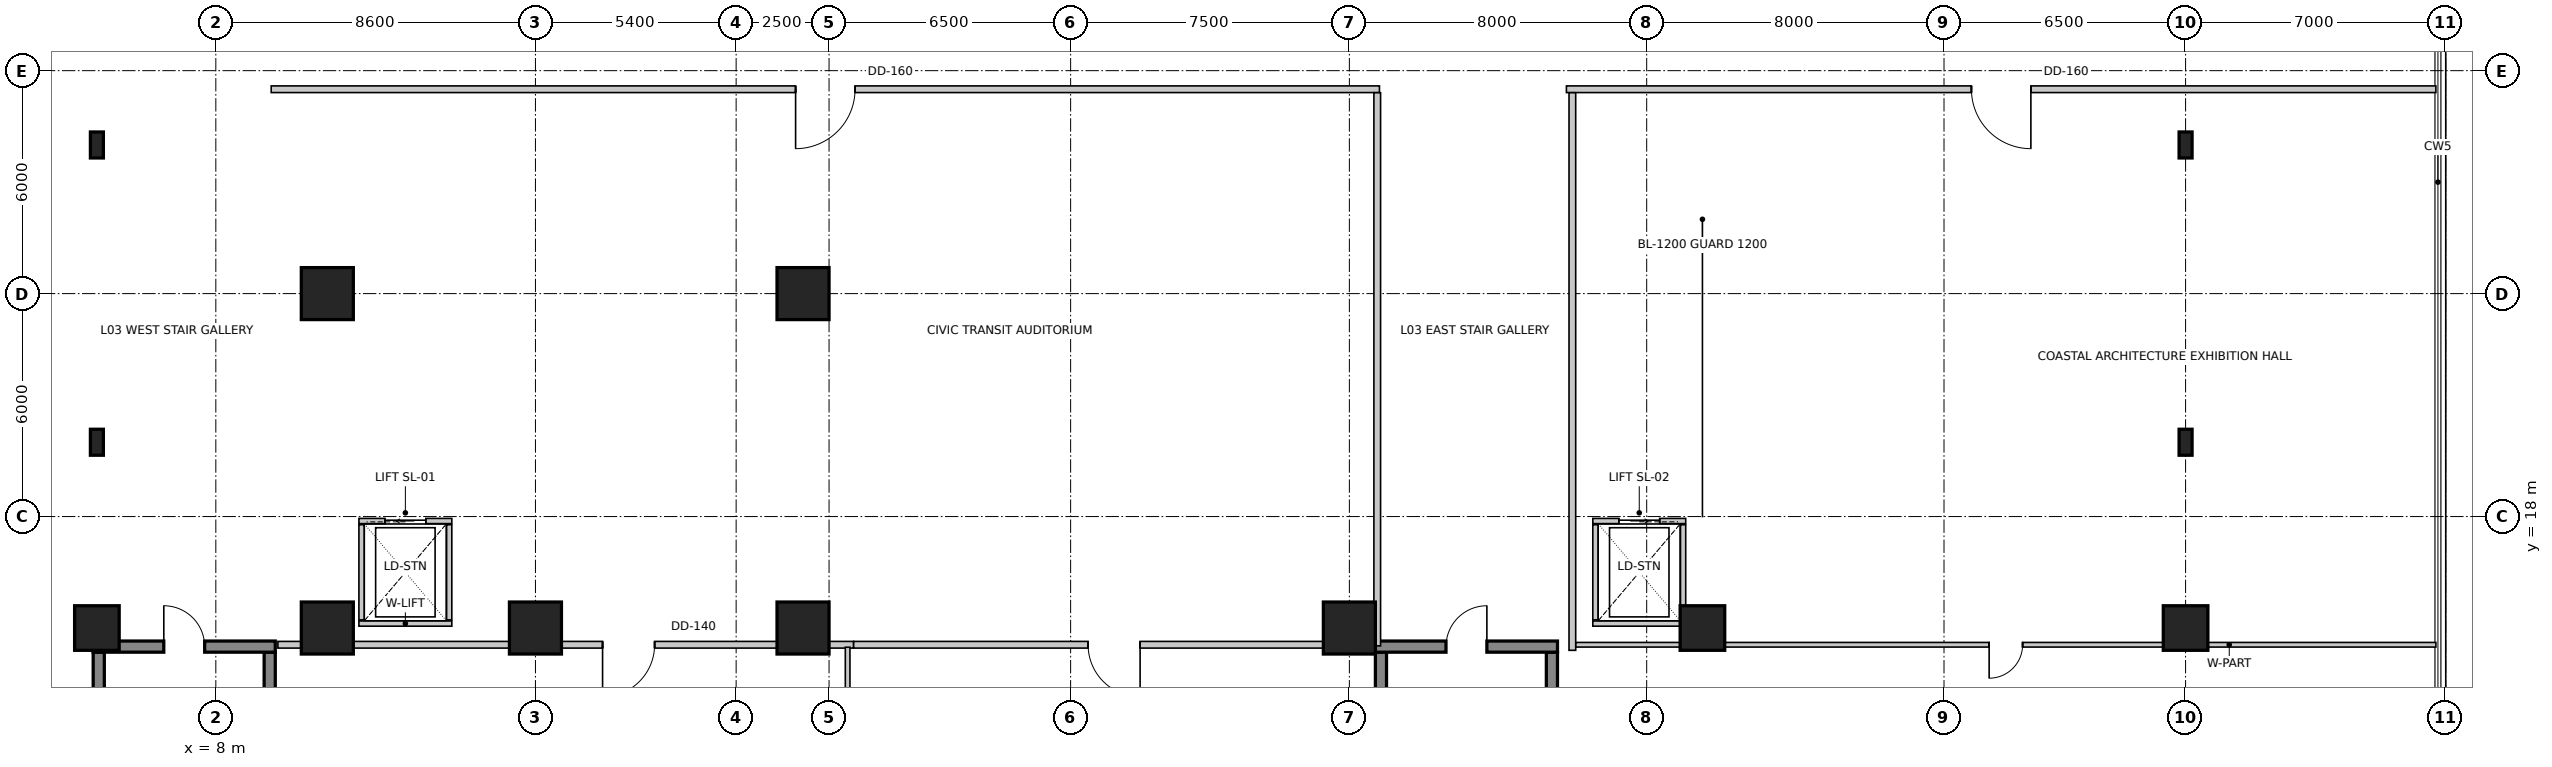
"""IFC4 building model, lengths in metres.
Left out: names, types, materials, properties, quantities, classifications, styles, units other than length and angle.
Written with IfcOpenShell. Run it as: python <this file> out.ifc"""

import sys

from ifc_helpers import new_model, si_unit, direction, frame, frame_2d, origin, origin_2d, place, context, subcontext, project, spatial, rectangle, extrude, source, transform, mapped, element, fill, save


model = new_model("IFC4")
c1 = context("Model", 3, precision=1e-05, world=origin(), true_north=direction((0.0, 1.0)))
c2 = subcontext(c1, "Body", "Model", "MODEL_VIEW")
j1 = project(units=[si_unit("LENGTHUNIT", "METRE"), si_unit("PLANEANGLEUNIT", "RADIAN")], contexts=[c1])
p1 = place(None, origin())
s1 = spatial("IfcSite", under=j1, at=p1, CompositionType="ELEMENT")
p2 = place(p1, origin())
s2 = spatial("IfcBuilding", under=s1, at=p2, CompositionType="ELEMENT")
p3 = place(p2, frame((0.0, 0.0, 11.2)))
s3 = spatial("IfcBuildingStorey", under=s2, at=p3, CompositionType="ELEMENT", Elevation=11.2)
for number, where, z_axis, x_axis in (
    (1, (4.85, 4.45, 0.0), (0.0, 0.0, 1.0), (0.0, 1.0, 0.0)),
    (2, (9.45, 4.45, 0.0), (0.0, 0.0, 1.0), (0.0, 1.0, 0.0)),
):
    element("IfcWall", number, at=place(p3, frame(where, z_axis=z_axis, x_axis=x_axis)), inside=s3, PredefinedType="SHEAR", context=c2, shape_type="SweptSolid", body=[
        extrude(rectangle(XDim=9.9, YDim=0.3, at=frame_2d((4.95, 0.0))), origin(), (0.0, 0.0, 1.0), 5.2),
    ])
p4 = place(p3, frame((4.7, 14.5, 0.0), z_axis=(0.0, 0.0, 1.0), x_axis=(1.0, 0.0, 0.0)))
e3 = element("IfcWall", 3, at=p4, inside=s3, PredefinedType="SHEAR", context=c2, shape_type="SweptSolid", body=[
    extrude(rectangle(XDim=4.9, YDim=0.3, at=frame_2d((2.45, 0.0))), origin(), (0.0, 0.0, 1.0), 5.2),
])
m1 = source(origin(), c2, "Body", "SweptSolid", [
    extrude(rectangle(XDim=1.1, YDim=2.15, at=frame_2d((0.55, 1.075))), frame((0.0, 0.16, 0.0), z_axis=(0.0, -1.0, 0.0), x_axis=(1.0, 0.0, 0.0)), (0.0, 0.0, 1.0), 0.32),
])
p5 = place(p4, frame((1.9, 0.0, 0.0)))
e4 = element("IfcOpeningElement", 4, at=p5, cuts=e3, PredefinedType="OPENING", context=c2, shape_type="MappedRepresentation", body=[
    mapped(m1, transform((0.0, 0.0, 0.0), scale=1.0)),
])
for number, where, z_axis, x_axis in (
    (5, (39.35, 4.45, 0.0), (0.0, 0.0, 1.0), (0.0, 1.0, 0.0)),
    (6, (43.95, 4.45, 0.0), (0.0, 0.0, 1.0), (0.0, 1.0, 0.0)),
):
    element("IfcWall", number, at=place(p3, frame(where, z_axis=z_axis, x_axis=x_axis)), inside=s3, PredefinedType="SHEAR", context=c2, shape_type="SweptSolid", body=[
        extrude(rectangle(XDim=9.9, YDim=0.3, at=frame_2d((4.95, 0.0))), origin(), (0.0, 0.0, 1.0), 5.2),
    ])
p6 = place(p3, frame((39.2, 14.5, 0.0), z_axis=(0.0, 0.0, 1.0), x_axis=(1.0, 0.0, 0.0)))
e7 = element("IfcWall", 7, at=p6, inside=s3, PredefinedType="SHEAR", context=c2, shape_type="SweptSolid", body=[
    extrude(rectangle(XDim=4.9, YDim=0.3, at=frame_2d((2.45, 0.0))), origin(), (0.0, 0.0, 1.0), 5.2),
])
p7 = place(p6, frame((1.9, 0.0, 0.0)))
e8 = element("IfcOpeningElement", 8, at=p7, cuts=e7, PredefinedType="OPENING", context=c2, shape_type="MappedRepresentation", body=[
    mapped(m1, transform((0.0, 0.0, 0.0), scale=1.0)),
])
m2 = source(origin(), c2, "Body", "SweptSolid", [
    extrude(rectangle(XDim=1.2, YDim=1.2, at=origin_2d()), origin(), (0.0, 0.0, 1.0), 5.2),
])
p8 = place(p3, frame((4.8, 15.0, 0.0), z_axis=(0.0, 0.0, 1.0), x_axis=(1.0, 0.0, 0.0)))
e9 = element("IfcColumn", 9, at=p8, inside=s3, PredefinedType="COLUMN", context=c2, shape_type="MappedRepresentation", body=[
    mapped(m2, transform((0.0, 0.0, 0.0), scale=1.0)),
])
m3 = source(origin(), c2, "Body", "SweptSolid", [
    extrude(rectangle(XDim=1.4, YDim=1.4, at=origin_2d()), origin(), (0.0, 0.0, 1.0), 5.2),
])
for number, where, z_axis, x_axis in (
    (10, (11.0, 15.0, 0.0), (0.0, 0.0, 1.0), (1.0, 0.0, 0.0)),
    (11, (16.6, 15.0, 0.0), (0.0, 0.0, 1.0), (1.0, 0.0, 0.0)),
    (12, (23.8, 15.0, 0.0), (0.0, 0.0, 1.0), (1.0, 0.0, 0.0)),
    (13, (38.5, 15.0, 0.0), (0.0, 0.0, 1.0), (1.0, 0.0, 0.0)),
):
    element("IfcColumn", number, at=place(p3, frame(where, z_axis=z_axis, x_axis=x_axis)), inside=s3, PredefinedType="COLUMN", context=c2, shape_type="MappedRepresentation", body=[
        mapped(m3, transform((0.0, 0.0, 0.0), scale=1.0)),
    ])
for number, where, z_axis, x_axis in (
    (14, (48.0, 15.0, 0.0), (0.0, 0.0, 1.0), (1.0, 0.0, 0.0)),
    (15, (61.0, 15.0, 0.0), (0.0, 0.0, 1.0), (1.0, 0.0, 0.0)),
):
    element("IfcColumn", number, at=place(p3, frame(where, z_axis=z_axis, x_axis=x_axis)), inside=s3, PredefinedType="COLUMN", context=c2, shape_type="MappedRepresentation", body=[
        mapped(m2, transform((0.0, 0.0, 0.0), scale=1.0)),
    ])
for number, where, z_axis, x_axis in (
    (16, (11.0, 24.0, 0.0), (0.0, 0.0, 1.0), (1.0, 0.0, 0.0)),
    (17, (23.8, 24.0, 0.0), (0.0, 0.0, 1.0), (1.0, 0.0, 0.0)),
):
    element("IfcColumn", number, at=place(p3, frame(where, z_axis=z_axis, x_axis=x_axis)), inside=s3, PredefinedType="COLUMN", context=c2, shape_type="MappedRepresentation", body=[
        mapped(m3, transform((0.0, 0.0, 0.0), scale=1.0)),
    ])
m4 = source(origin(), c2, "Body", "SweptSolid", [
    extrude(rectangle(XDim=0.35, YDim=0.7, at=origin_2d()), origin(), (0.0, 0.0, 1.0), 5.2),
])
for number, where, z_axis, x_axis in (
    (18, (4.8, 20.0, 0.0), (0.0, 0.0, 1.0), (1.0, 0.0, 0.0)),
    (19, (4.8, 28.0, 0.0), (0.0, 0.0, 1.0), (1.0, 0.0, 0.0)),
    (20, (61.0, 20.0, 0.0), (0.0, 0.0, 1.0), (1.0, 0.0, 0.0)),
    (21, (61.0, 28.0, 0.0), (0.0, 0.0, 1.0), (1.0, 0.0, 0.0)),
):
    element("IfcColumn", number, at=place(p3, frame(where, z_axis=z_axis, x_axis=x_axis)), inside=s3, PredefinedType="PILASTER", context=c2, shape_type="MappedRepresentation", body=[
        mapped(m4, transform((0.0, 0.0, 0.0), scale=1.0)),
    ])
p9 = place(p3, frame((11.85, 17.88, 0.0), z_axis=(0.0, 0.0, 1.0), x_axis=(1.0, 0.0, 0.0)))
e22 = element("IfcWall", 22, at=p9, inside=s3, PredefinedType="SOLIDWALL", context=c2, shape_type="SweptSolid", body=[
    extrude(rectangle(XDim=2.5, YDim=0.14, at=frame_2d((1.25, 0.0))), origin(), (0.0, 0.0, 1.0), 4.9),
])
m5 = source(origin(), c2, "Body", "SweptSolid", [
    extrude(rectangle(XDim=1.1, YDim=2.15, at=frame_2d((0.55, 1.075))), frame((0.0, 0.08, 0.0), z_axis=(0.0, -1.0, 0.0), x_axis=(1.0, 0.0, 0.0)), (0.0, 0.0, 1.0), 0.16),
])
p10 = place(p9, frame((0.7, 0.0, 0.0)))
e23 = element("IfcOpeningElement", 23, at=p10, cuts=e22, PredefinedType="OPENING", context=c2, shape_type="MappedRepresentation", body=[
    mapped(m5, transform((0.0, 0.0, 0.0), scale=1.0)),
])
p11 = place(p3, frame((11.85, 15.12, 0.0), z_axis=(0.0, 0.0, 1.0), x_axis=(1.0, 0.0, 0.0)))
e24 = element("IfcWall", 24, at=p11, inside=s3, PredefinedType="SOLIDWALL", context=c2, shape_type="SweptSolid", body=[
    extrude(rectangle(XDim=2.5, YDim=0.14, at=frame_2d((1.25, 0.0))), origin(), (0.0, 0.0, 1.0), 3.692),
])
for number, where, z_axis, x_axis in (
    (25, (11.92, 15.22, 0.0), (0.0, 0.0, 1.0), (0.0, 1.0, 0.0)),
    (26, (14.28, 15.22, 0.0), (0.0, 0.0, 1.0), (0.0, 1.0, 0.0)),
):
    element("IfcWall", number, at=place(p3, frame(where, z_axis=z_axis, x_axis=x_axis)), inside=s3, PredefinedType="SOLIDWALL", context=c2, shape_type="SweptSolid", body=[
        extrude(rectangle(XDim=2.56, YDim=0.14, at=frame_2d((1.28, 0.0))), origin(), (0.0, 0.0, 1.0), 3.692),
    ])
p12 = place(p3, frame((45.05, 17.88, 0.0), z_axis=(0.0, 0.0, 1.0), x_axis=(1.0, 0.0, 0.0)))
e27 = element("IfcWall", 27, at=p12, inside=s3, PredefinedType="SOLIDWALL", context=c2, shape_type="SweptSolid", body=[
    extrude(rectangle(XDim=2.5, YDim=0.14, at=frame_2d((1.25, 0.0))), origin(), (0.0, 0.0, 1.0), 4.9),
])
p13 = place(p12, frame((0.7, 0.0, 0.0)))
e28 = element("IfcOpeningElement", 28, at=p13, cuts=e27, PredefinedType="OPENING", context=c2, shape_type="MappedRepresentation", body=[
    mapped(m5, transform((0.0, 0.0, 0.0), scale=1.0)),
])
p14 = place(p3, frame((45.05, 15.12, 0.0), z_axis=(0.0, 0.0, 1.0), x_axis=(1.0, 0.0, 0.0)))
e29 = element("IfcWall", 29, at=p14, inside=s3, PredefinedType="SOLIDWALL", context=c2, shape_type="SweptSolid", body=[
    extrude(rectangle(XDim=2.5, YDim=0.14, at=frame_2d((1.25, 0.0))), origin(), (0.0, 0.0, 1.0), 3.692),
])
p15 = place(p3, frame((45.12, 15.22, 0.0), z_axis=(0.0, 0.0, 1.0), x_axis=(0.0, 1.0, 0.0)))
e30 = element("IfcWall", 30, at=p15, inside=s3, PredefinedType="SOLIDWALL", context=c2, shape_type="SweptSolid", body=[
    extrude(rectangle(XDim=2.56, YDim=0.14, at=frame_2d((1.28, 0.0))), origin(), (0.0, 0.0, 1.0), 3.692),
])
p16 = place(p3, frame((47.48, 15.22, 0.0), z_axis=(0.0, 0.0, 1.0), x_axis=(0.0, 1.0, 0.0)))
e31 = element("IfcWall", 31, at=p16, inside=s3, PredefinedType="SOLIDWALL", context=c2, shape_type="SweptSolid", body=[
    extrude(rectangle(XDim=2.56, YDim=0.14, at=frame_2d((1.28, 0.0))), origin(), (0.0, 0.0, 1.0), 3.092),
])
p17 = place(p3, frame((39.31, 29.5, 0.0), z_axis=(0.0, 0.0, 1.0), x_axis=(-1.0, 0.0, 0.0)))
e32 = element("IfcWall", 32, at=p17, inside=s3, PredefinedType="PARTITIONING", context=c2, shape_type="SweptSolid", body=[
    extrude(rectangle(XDim=29.82, YDim=0.18, at=frame_2d((14.91, 0.0))), origin(), (0.0, 0.0, 1.0), 4.03),
])
m6 = source(origin(), c2, "Body", "SweptSolid", [
    extrude(rectangle(XDim=1.6, YDim=2.15, at=frame_2d((0.8, 1.075))), frame((0.0, 0.1, 0.0), z_axis=(0.0, -1.0, 0.0), x_axis=(1.0, 0.0, 0.0)), (0.0, 0.0, 1.0), 0.2),
])
p18 = place(p17, frame((14.11, 0.0, 0.0)))
e33 = element("IfcOpeningElement", 33, at=p18, cuts=e32, PredefinedType="OPENING", context=c2, shape_type="MappedRepresentation", body=[
    mapped(m6, transform((0.0, 0.0, 0.0), scale=1.0)),
])
p19 = place(p3, frame((67.735, 29.5, 0.0), z_axis=(0.0, 0.0, 1.0), x_axis=(-1.0, 0.0, 0.0)))
e34 = element("IfcWall", 34, at=p19, inside=s3, PredefinedType="PARTITIONING", context=c2, shape_type="SweptSolid", body=[
    extrude(rectangle(XDim=23.395, YDim=0.18, at=frame_2d((11.698, 0.0))), origin(), (0.0, 0.0, 1.0), 3.092),
])
p20 = place(p19, frame((10.897, 0.0, 0.0)))
e35 = element("IfcOpeningElement", 35, at=p20, cuts=e34, PredefinedType="OPENING", context=c2, shape_type="MappedRepresentation", body=[
    mapped(m6, transform((0.0, 0.0, 0.0), scale=1.0)),
])
p21 = place(p3, frame((39.25, 14.52, 0.0), z_axis=(0.0, 0.0, 1.0), x_axis=(0.0, 1.0, 0.0)))
e36 = element("IfcWall", 36, at=p21, inside=s3, PredefinedType="PARTITIONING", context=c2, shape_type="SweptSolid", body=[
    extrude(rectangle(XDim=14.886, YDim=0.18, at=frame_2d((7.443, 0.0))), origin(), (0.0, 0.0, 1.0), 3.692),
])
p22 = place(p3, frame((44.5, 29.406, 0.0), z_axis=(0.0, 0.0, 1.0), x_axis=(0.0, -1.0, 0.0)))
e37 = element("IfcWall", 37, at=p22, inside=s3, PredefinedType="PARTITIONING", context=c2, shape_type="SweptSolid", body=[
    extrude(rectangle(XDim=15.006, YDim=0.18, at=frame_2d((7.503, 0.0))), origin(), (0.0, 0.0, 1.0), 3.692),
])
p23 = place(p3, frame((25.16, 14.55, 0.0), z_axis=(0.0, 0.0, 1.0), x_axis=(-1.0, 0.0, 0.0)))
e38 = element("IfcWall", 38, at=p23, inside=s3, PredefinedType="PARTITIONING", context=c2, shape_type="SweptSolid", body=[
    extrude(rectangle(XDim=15.49, YDim=0.18, at=frame_2d((7.745, 0.0))), origin(), (0.0, 0.0, 1.0), 3.942),
])
m7 = source(origin(), c2, "Body", "SweptSolid", [
    extrude(rectangle(XDim=1.4, YDim=2.15, at=frame_2d((0.7, 1.075))), frame((0.0, 0.1, 0.0), z_axis=(0.0, -1.0, 0.0), x_axis=(1.0, 0.0, 0.0)), (0.0, 0.0, 1.0), 0.2),
])
p24 = place(p23, frame((5.354, 0.0, 0.0)))
e39 = element("IfcOpeningElement", 39, at=p24, cuts=e38, PredefinedType="OPENING", context=c2, shape_type="MappedRepresentation", body=[
    mapped(m7, transform((0.0, 0.0, 0.0), scale=1.0)),
])
p25 = place(p3, frame((39.056, 14.55, 0.0), z_axis=(0.0, 0.0, 1.0), x_axis=(-1.0, 0.0, 0.0)))
e40 = element("IfcWall", 40, at=p25, inside=s3, PredefinedType="PARTITIONING", context=c2, shape_type="SweptSolid", body=[
    extrude(rectangle(XDim=13.894, YDim=0.18, at=frame_2d((6.947, 0.0))), origin(), (0.0, 0.0, 1.0), 4.485),
])
p26 = place(p25, frame((6.187, 0.0, 0.0)))
e41 = element("IfcOpeningElement", 41, at=p26, cuts=e40, PredefinedType="OPENING", context=c2, shape_type="MappedRepresentation", body=[
    mapped(m7, transform((0.0, 0.0, 0.0), scale=1.0)),
])
p27 = place(p3, frame((67.735, 14.55, 0.0), z_axis=(0.0, 0.0, 1.0), x_axis=(-1.0, 0.0, 0.0)))
e42 = element("IfcWall", 42, at=p27, inside=s3, PredefinedType="PARTITIONING", context=c2, shape_type="SweptSolid", body=[
    extrude(rectangle(XDim=23.141, YDim=0.125, at=frame_2d((11.571, 0.0))), origin(), (0.0, 0.0, 1.0), 3.942),
])
m8 = source(origin(), c2, "Body", "SweptSolid", [
    extrude(rectangle(XDim=0.9, YDim=2.15, at=frame_2d((0.45, 1.075))), frame((0.0, 0.073, 0.0), z_axis=(0.0, -1.0, 0.0), x_axis=(1.0, 0.0, 0.0)), (0.0, 0.0, 1.0), 0.145),
])
p28 = place(p27, frame((11.121, 0.0, 0.0)))
e43 = element("IfcOpeningElement", 43, at=p28, cuts=e42, PredefinedType="OPENING", context=c2, shape_type="MappedRepresentation", body=[
    mapped(m8, transform((0.0, 0.0, 0.0), scale=1.0)),
])
p29 = place(p3, frame((25.0, 14.483, 0.0), z_axis=(0.0, 0.0, 1.0), x_axis=(0.0, -1.0, 0.0)))
e44 = element("IfcWall", 44, at=p29, inside=s3, PredefinedType="PARTITIONING", context=c2, shape_type="SweptSolid", body=[
    extrude(rectangle(XDim=12.219, YDim=0.125, at=frame_2d((6.109, 0.0))), origin(), (0.0, 0.0, 1.0), 3.692),
])
m9 = source(origin(), c2, "Body", "SweptSolid", [
    extrude(rectangle(XDim=1.1, YDim=2.15, at=frame_2d((0.55, 1.075))), frame((0.0, 0.025, 0.0), z_axis=(0.0, -1.0, 0.0), x_axis=(1.0, 0.0, 0.0)), (0.0, 0.0, 1.0), 0.05),
])
p30 = place(p10, origin())
e45 = element("IfcDoor", 45, at=p30, inside=s3, OperationType="SLIDING_TO_LEFT", PredefinedType="DOOR", context=c2, shape_type="MappedRepresentation", body=[
    mapped(m9, transform((0.0, 0.0, 0.0), scale=1.0)),
])
fill(e23, e45)
p31 = place(p13, origin())
e46 = element("IfcDoor", 46, at=p31, inside=s3, OperationType="SLIDING_TO_RIGHT", PredefinedType="DOOR", context=c2, shape_type="MappedRepresentation", body=[
    mapped(m9, transform((0.0, 0.0, 0.0), scale=1.0)),
])
fill(e28, e46)
m10 = source(origin(), c2, "Body", "SweptSolid", [
    extrude(rectangle(XDim=1.1, YDim=2.15, at=frame_2d((0.55, 1.075))), frame((0.0, 0.025, 0.0), z_axis=(0.0, -1.0, 0.0), x_axis=(1.0, 0.0, 0.0)), (0.0, 0.0, 1.0), 0.05),
])
p32 = place(p5, origin())
e47 = element("IfcDoor", 47, at=p32, inside=s3, OperationType="SINGLE_SWING_LEFT", PredefinedType="DOOR", context=c2, shape_type="MappedRepresentation", body=[
    mapped(m10, transform((0.0, 0.0, 0.0), scale=1.0)),
])
fill(e4, e47)
p33 = place(p7, origin())
e48 = element("IfcDoor", 48, at=p33, inside=s3, OperationType="SINGLE_SWING_RIGHT", PredefinedType="DOOR", context=c2, shape_type="MappedRepresentation", body=[
    mapped(m10, transform((0.0, 0.0, 0.0), scale=1.0)),
])
fill(e8, e48)
m11 = source(origin(), c2, "Body", "SweptSolid", [
    extrude(rectangle(XDim=1.6, YDim=2.15, at=frame_2d((0.8, 1.075))), frame((0.0, 0.025, 0.0), z_axis=(0.0, -1.0, 0.0), x_axis=(1.0, 0.0, 0.0)), (0.0, 0.0, 1.0), 0.05),
])
p34 = place(p18, origin())
e49 = element("IfcDoor", 49, at=p34, inside=s3, OperationType="SINGLE_SWING_RIGHT", PredefinedType="DOOR", context=c2, shape_type="MappedRepresentation", body=[
    mapped(m11, transform((0.0, 0.0, 0.0), scale=1.0)),
])
fill(e33, e49)
p35 = place(p20, origin())
e50 = element("IfcDoor", 50, at=p35, inside=s3, OperationType="SINGLE_SWING_LEFT", PredefinedType="DOOR", context=c2, shape_type="MappedRepresentation", body=[
    mapped(m11, transform((0.0, 0.0, 0.0), scale=1.0)),
])
fill(e35, e50)
m12 = source(origin(), c2, "Body", "SweptSolid", [
    extrude(rectangle(XDim=1.4, YDim=2.15, at=frame_2d((0.7, 1.075))), frame((0.0, 0.025, 0.0), z_axis=(0.0, -1.0, 0.0), x_axis=(1.0, 0.0, 0.0)), (0.0, 0.0, 1.0), 0.05),
])
p36 = place(p24, origin())
e51 = element("IfcDoor", 51, at=p36, inside=s3, OperationType="SINGLE_SWING_RIGHT", PredefinedType="DOOR", context=c2, shape_type="MappedRepresentation", body=[
    mapped(m12, transform((0.0, 0.0, 0.0), scale=1.0)),
])
fill(e39, e51)
p37 = place(p26, origin())
e52 = element("IfcDoor", 52, at=p37, inside=s3, OperationType="SINGLE_SWING_LEFT", PredefinedType="DOOR", context=c2, shape_type="MappedRepresentation", body=[
    mapped(m12, transform((0.0, 0.0, 0.0), scale=1.0)),
])
fill(e41, e52)
m13 = source(origin(), c2, "Body", "SweptSolid", [
    extrude(rectangle(XDim=0.9, YDim=2.15, at=frame_2d((0.45, 1.075))), frame((0.0, 0.025, 0.0), z_axis=(0.0, -1.0, 0.0), x_axis=(1.0, 0.0, 0.0)), (0.0, 0.0, 1.0), 0.05),
])
p38 = place(p28, origin())
e53 = element("IfcDoor", 53, at=p38, inside=s3, OperationType="SINGLE_SWING_RIGHT", PredefinedType="DOOR", context=c2, shape_type="MappedRepresentation", body=[
    mapped(m13, transform((0.0, 0.0, 0.0), scale=1.0)),
])
fill(e43, e53)
save(model, sys.argv[1])
